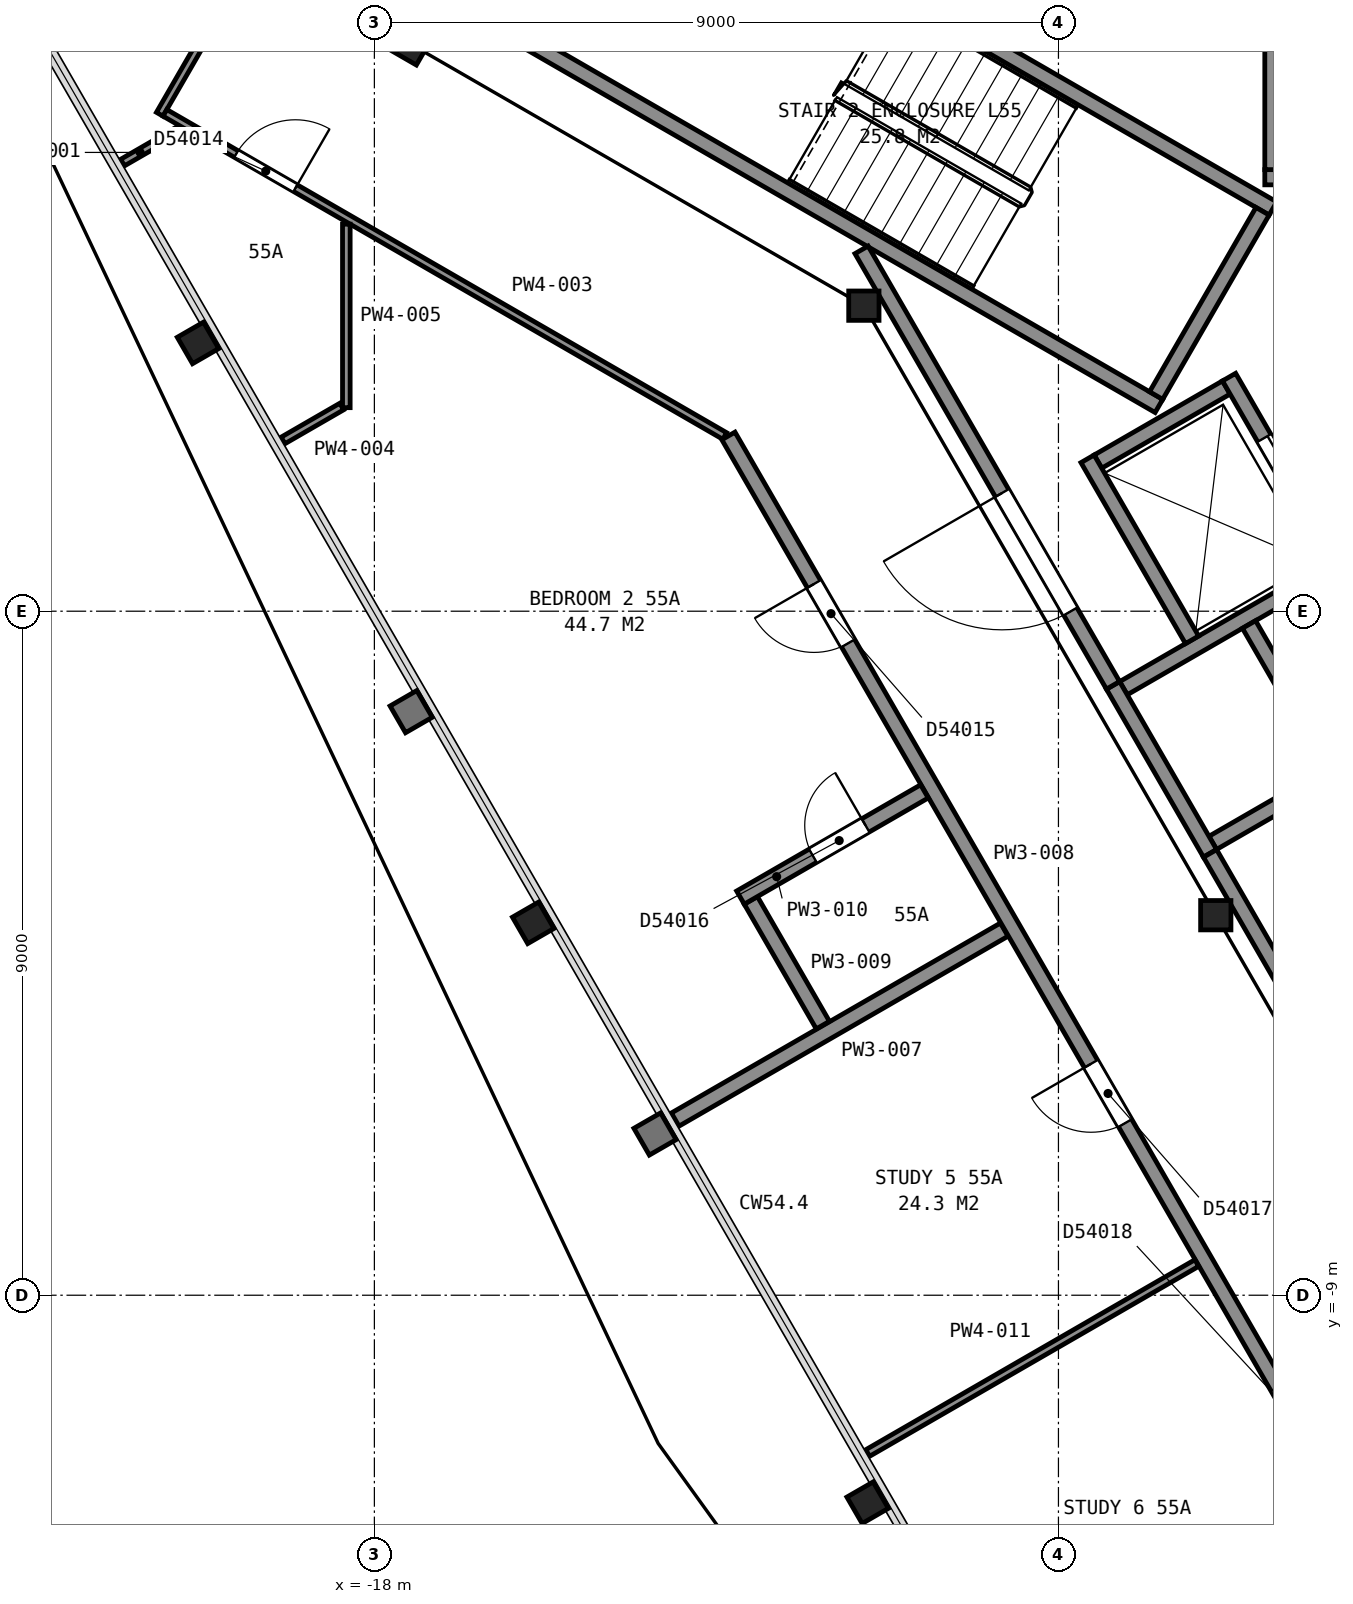
"""IFC4 building model, lengths in metres.
Left out: names, types, materials, properties, quantities, classifications, styles, units other than length and angle.
Written with IfcOpenShell. Run it as: python <this file> out.ifc"""

import sys

from ifc_helpers import new_model, si_unit, direction, frame, frame_2d, origin, origin_2d, place, context, subcontext, project, spatial, rectangle, i_section, extrude, element, fill, save


model = new_model("IFC4")
c1 = context("Model", 3, precision=1e-05, world=origin(), true_north=direction((0.0, 1.0)))
c2 = subcontext(c1, "Body", "Model", "MODEL_VIEW")
j1 = project(units=[si_unit("LENGTHUNIT", "METRE"), si_unit("PLANEANGLEUNIT", "RADIAN")], contexts=[c1])
p1 = place(None, origin())
s1 = spatial("IfcSite", under=j1, at=p1, CompositionType="ELEMENT")
p2 = place(p1, origin())
s2 = spatial("IfcBuilding", under=s1, at=p2, CompositionType="ELEMENT")
p3 = place(p2, frame((0.0, 0.0, 221.2)))
s3 = spatial("IfcBuildingStorey", under=s2, at=p3, CompositionType="ELEMENT", Elevation=221.2)
for number, where, z_axis, x_axis in (
    (1, (-20.32, 3.53, 0.0), (0.0, 0.0, 1.0), (-0.5, 0.866, 0.0)),
    (2, (-15.91, -4.1, 0.0), (0.0, 0.0, 1.0), (-0.5, 0.866, 0.0)),
    (3, (-11.51, -11.73, 0.0), (0.0, 0.0, 1.0), (-0.5, 0.866, 0.0)),
    (4, (-17.52, 7.46, 0.0), (0.0, 0.0, 1.0), (0.5, 0.866, 0.0)),
):
    element("IfcColumn", number, at=place(p3, frame(where, z_axis=z_axis, x_axis=x_axis)), inside=s3, PredefinedType="COLUMN", context=c2, shape_type="SweptSolid", body=[
        extrude(i_section(OverallWidth=0.401, OverallDepth=0.399, WebThickness=0.025, FlangeThickness=0.04, FilletRadius=0.015, at=origin_2d()), origin(), (0.0, 0.0, 1.0), 3.7),
    ])
for number, where, z_axis, x_axis in (
    (5, (-11.56, 4.02, 0.0), (0.0, 0.0, 1.0), (1.0, 0.0, 0.0)),
    (6, (-6.93, -4.0, 0.0), (0.0, 0.0, 1.0), (1.0, 0.0, 0.0)),
):
    element("IfcColumn", number, at=place(p3, frame(where, z_axis=z_axis, x_axis=x_axis)), inside=s3, PredefinedType="COLUMN", context=c2, shape_type="SweptSolid", body=[
        extrude(i_section(OverallWidth=0.399, OverallDepth=0.386, WebThickness=0.021, FlangeThickness=0.033, FilletRadius=0.015, at=origin_2d()), origin(), (0.0, 0.0, 1.0), 3.7),
    ])
for number, where, z_axis, x_axis in (
    (7, (-7.678, 2.701, 0.0), (0.0, 0.0, 1.0), (-0.866, 0.5, 0.0)),
    (8, (-6.178, 5.299, 0.0), (0.0, 0.0, 1.0), (-0.866, 0.5, 0.0)),
):
    element("IfcWall", number, at=place(p3, frame(where, z_axis=z_axis, x_axis=x_axis)), inside=s3, PredefinedType="PARTITIONING", context=c2, shape_type="SweptSolid", body=[
        extrude(rectangle(XDim=9.6, YDim=0.2, at=frame_2d((4.8, 0.0))), origin(), (0.0, 0.0, 1.0), 3.45),
    ])
p4 = place(p3, frame((-6.315, 5.262, 0.0), z_axis=(0.0, 0.0, 1.0), x_axis=(-0.500049511043, -0.865996816683, 0.0)))
e9 = element("IfcWall", 9, at=p4, inside=s3, PredefinedType="PARTITIONING", context=c2, shape_type="SweptSolid", body=[
    extrude(rectangle(XDim=2.8, YDim=0.2, at=frame_2d((1.4, 0.0))), origin(), (0.0, 0.0, 1.0), 3.45),
])
p5 = place(p3, frame((-6.285, 5.71, 0.0), z_axis=(0.0, 0.0, 1.0), x_axis=(1.0, 0.0, 0.0)))
e10 = element("IfcWall", 10, at=p5, inside=s3, PredefinedType="PARTITIONING", context=c2, shape_type="SweptSolid", body=[
    extrude(rectangle(XDim=2.35, YDim=0.2, at=frame_2d((1.175, 0.0))), origin(), (0.0, 0.0, 1.0), 3.7),
])
p6 = place(p3, frame((-6.97, -3.048, 0.0), z_axis=(0.0, 0.0, 1.0), x_axis=(0.866036909293, 0.499980071345, 0.0)))
e11 = element("IfcWall", 11, at=p6, inside=s3, PredefinedType="PARTITIONING", context=c2, shape_type="SweptSolid", body=[
    extrude(rectangle(XDim=1.75, YDim=0.2, at=frame_2d((0.875, 0.0))), origin(), (0.0, 0.0, 1.0), 3.7),
])
p7 = place(p3, frame((-8.145, -1.013, 0.0), z_axis=(0.0, 0.0, 1.0), x_axis=(0.866016494683, 0.500015430699, 0.0)))
e12 = element("IfcWall", 12, at=p7, inside=s3, PredefinedType="PARTITIONING", context=c2, shape_type="SweptSolid", body=[
    extrude(rectangle(XDim=3.15, YDim=0.2, at=frame_2d((1.575, 0.0))), origin(), (0.0, 0.0, 1.0), 3.7),
])
p8 = place(p3, frame((-8.48, 1.969, 0.0), z_axis=(0.0, 0.0, 1.0), x_axis=(0.866000020948, 0.500043961785, 0.0)))
e13 = element("IfcWall", 13, at=p8, inside=s3, PredefinedType="PARTITIONING", context=c2, shape_type="SweptSolid", body=[
    extrude(rectangle(XDim=1.95, YDim=0.2, at=frame_2d((0.975, 0.0))), origin(), (0.0, 0.0, 1.0), 3.7),
])
p9 = place(p3, frame((-6.185, 5.81, 0.0), z_axis=(0.0, 0.0, 1.0), x_axis=(0.0, 1.0, 0.0)))
e14 = element("IfcWall", 14, at=p9, inside=s3, PredefinedType="PARTITIONING", context=c2, shape_type="SweptSolid", body=[
    extrude(rectangle(XDim=1.75, YDim=0.2, at=frame_2d((0.875, 0.0))), origin(), (0.0, 0.0, 1.0), 3.7),
])
p10 = place(p3, frame((-5.28, 0.525, 0.0), z_axis=(0.0, 0.0, 1.0), x_axis=(-0.500037662692, 0.866003658127, 0.0)))
e15 = element("IfcWall", 15, at=p10, inside=s3, PredefinedType="PARTITIONING", context=c2, shape_type="SweptSolid", body=[
    extrude(rectangle(XDim=2.95, YDim=0.2, at=frame_2d((1.475, 0.0))), origin(), (0.0, 0.0, 1.0), 3.7),
])
p11 = place(p10, frame((0.925, 0.0, 0.0)))
e16 = element("IfcOpeningElement", 16, at=p11, cuts=e15, PredefinedType="OPENING", context=c2, shape_type="SweptSolid", body=[
    extrude(rectangle(XDim=1.1, YDim=2.1, at=frame_2d((0.55, 1.05))), frame((0.0, 0.11, 0.0), z_axis=(0.0, -1.0, 0.0), x_axis=(1.0, 0.0, 0.0)), (0.0, 0.0, 1.0), 0.22),
])
p12 = place(p3, frame((-5.318, -2.21, 0.0), z_axis=(0.0, 0.0, 1.0), x_axis=(-0.499938297808, 0.866061024631, 0.0)))
e17 = element("IfcWall", 17, at=p12, inside=s3, PredefinedType="PARTITIONING", context=c2, shape_type="SweptSolid", body=[
    extrude(rectangle(XDim=2.35, YDim=0.2, at=frame_2d((1.175, 0.0))), origin(), (0.0, 0.0, 1.0), 3.7),
])
p13 = place(p3, frame((-7.242, -0.376, 0.0), z_axis=(0.0, 0.0, 1.0), x_axis=(-0.499996545922, 0.866027397988, 0.0)))
e18 = element("IfcWall", 18, at=p13, inside=s3, PredefinedType="PARTITIONING", context=c2, shape_type="SweptSolid", body=[
    extrude(rectangle(XDim=2.75, YDim=0.2, at=frame_2d((1.375, 0.0))), origin(), (0.0, 0.0, 1.0), 3.7),
])
p14 = place(p3, frame((-7.006, -3.185, 0.0), z_axis=(0.0, 0.0, 1.0), x_axis=(-0.499990435942, 0.866030925526, 0.0)))
e19 = element("IfcWall", 19, at=p14, inside=s3, PredefinedType="PARTITIONING", context=c2, shape_type="SweptSolid", body=[
    extrude(rectangle(XDim=2.55, YDim=0.2, at=frame_2d((1.275, 0.0))), origin(), (0.0, 0.0, 1.0), 3.7),
])
p15 = place(p3, frame((-11.591, 4.755, 0.0), z_axis=(0.0, 0.0, 1.0), x_axis=(0.500043977787, -0.866000011708, 0.0)))
e20 = element("IfcWall", 20, at=p15, inside=s3, PredefinedType="PARTITIONING", context=c2, shape_type="SweptSolid", body=[
    extrude(rectangle(XDim=6.617, YDim=0.2, at=frame_2d((3.308, 0.0))), origin(), (0.0, 0.0, 1.0), 3.45),
])
p16 = place(p15, frame((3.695, 0.0, 0.0)))
e21 = element("IfcOpeningElement", 21, at=p16, cuts=e20, PredefinedType="OPENING", context=c2, shape_type="SweptSolid", body=[
    extrude(rectangle(XDim=1.8, YDim=2.1, at=frame_2d((0.9, 1.05))), frame((0.0, 0.11, 0.0), z_axis=(0.0, -1.0, 0.0), x_axis=(1.0, 0.0, 0.0)), (0.0, 0.0, 1.0), 0.22),
])
p17 = place(p3, frame((-7.005, -3.187, 0.0), z_axis=(0.0, 0.0, 1.0), x_axis=(0.499689606989, -0.866204535123, 0.0)))
e22 = element("IfcWall", 22, at=p17, inside=s3, PredefinedType="PARTITIONING", context=c2, shape_type="SweptSolid", body=[
    extrude(rectangle(XDim=2.145, YDim=0.2, at=frame_2d((1.072, 0.0))), origin(), (0.0, 0.0, 1.0), 3.45),
])
p18 = place(p3, frame((-21.313, 5.903, 0.0), z_axis=(0.0, 0.0, 1.0), x_axis=(0.865952303503, 0.500126592033, 0.0)))
e23 = element("IfcWall", 23, at=p18, inside=s3, PredefinedType="PARTITIONING", context=c2, shape_type="SweptSolid", body=[
    extrude(rectangle(XDim=0.889, YDim=0.1, at=frame_2d((0.444, 0.0))), origin(), (0.0, 0.0, 1.0), 2.713),
])
p19 = place(p3, frame((-20.824, 6.539, 0.0), z_axis=(0.0, 0.0, 1.0), x_axis=(0.500297300687, 0.865853689098, 0.0)))
e24 = element("IfcWall", 24, at=p19, inside=s3, PredefinedType="PARTITIONING", context=c2, shape_type="SweptSolid", body=[
    extrude(rectangle(XDim=9.496, YDim=0.1, at=frame_2d((4.748, 0.0))), origin(), (0.0, 0.0, 1.0), 2.713),
])
p20 = place(p3, frame((-13.391, 2.305, 0.0), z_axis=(0.0, 0.0, 1.0), x_axis=(-0.86606177021, 0.499937006213, 0.0)))
e25 = element("IfcWall", 25, at=p20, inside=s3, PredefinedType="PARTITIONING", context=c2, shape_type="SweptSolid", body=[
    extrude(rectangle(XDim=8.504, YDim=0.1, at=frame_2d((4.252, 0.0))), origin(), (0.0, 0.0, 1.0), 2.713),
])
p21 = place(p20, frame((6.522, 0.0, 0.0)))
e26 = element("IfcOpeningElement", 26, at=p21, cuts=e25, PredefinedType="OPENING", context=c2, shape_type="SweptSolid", body=[
    extrude(rectangle(XDim=0.9, YDim=2.1, at=frame_2d((0.45, 1.05))), frame((0.0, 0.06, 0.0), z_axis=(0.0, -1.0, 0.0), x_axis=(1.0, 0.0, 0.0)), (0.0, 0.0, 1.0), 0.12),
])
p22 = place(p3, frame((-19.202, 2.247, 0.0), z_axis=(0.0, 0.0, 1.0), x_axis=(0.86604424267, 0.499967368674, 0.0)))
e27 = element("IfcWall", 27, at=p22, inside=s3, PredefinedType="PARTITIONING", context=c2, shape_type="SweptSolid", body=[
    extrude(rectangle(XDim=0.892, YDim=0.1, at=frame_2d((0.446, 0.0))), origin(), (0.0, 0.0, 1.0), 2.713),
])
p23 = place(p3, frame((-18.369, 2.678, 0.0), z_axis=(0.0, 0.0, 1.0), x_axis=(0.0, 1.0, 0.0)))
e28 = element("IfcWall", 28, at=p23, inside=s3, PredefinedType="PARTITIONING", context=c2, shape_type="SweptSolid", body=[
    extrude(rectangle(XDim=2.414, YDim=0.1, at=frame_2d((1.207, 0.0))), origin(), (0.0, 0.0, 1.0), 2.713),
])
p24 = place(p3, frame((-14.043, -6.689, 0.0), z_axis=(0.0, 0.0, 1.0), x_axis=(0.866053039883, 0.499952129818, 0.0)))
e29 = element("IfcWall", 29, at=p24, inside=s3, PredefinedType="PARTITIONING", context=c2, shape_type="SweptSolid", body=[
    extrude(rectangle(XDim=5.0, YDim=0.2, at=frame_2d((2.5, 0.0))), origin(), (0.0, 0.0, 1.0), 2.713),
])
p25 = place(p3, frame((-4.675, -12.706, 0.0), z_axis=(0.0, 0.0, 1.0), x_axis=(-0.49997440863, 0.866040178465, 0.0)))
e30 = element("IfcWall", 30, at=p25, inside=s3, PredefinedType="PARTITIONING", context=c2, shape_type="SweptSolid", body=[
    extrude(rectangle(XDim=17.335, YDim=0.2, at=frame_2d((8.667, 0.0))), origin(), (0.0, 0.0, 1.0), 2.713),
])
p26 = place(p25, frame((14.185, 0.0, 0.0)))
e31 = element("IfcOpeningElement", 31, at=p26, cuts=e30, PredefinedType="OPENING", context=c2, shape_type="SweptSolid", body=[
    extrude(rectangle(XDim=0.9, YDim=2.1, at=frame_2d((0.45, 1.05))), frame((0.0, 0.11, 0.0), z_axis=(0.0, -1.0, 0.0), x_axis=(1.0, 0.0, 0.0)), (0.0, 0.0, 1.0), 0.22),
])
p27 = place(p25, frame((6.895, 0.0, 0.0)))
e32 = element("IfcOpeningElement", 32, at=p27, cuts=e30, PredefinedType="OPENING", context=c2, shape_type="SweptSolid", body=[
    extrude(rectangle(XDim=0.9, YDim=2.1, at=frame_2d((0.45, 1.05))), frame((0.0, 0.11, 0.0), z_axis=(0.0, -1.0, 0.0), x_axis=(1.0, 0.0, 0.0)), (0.0, 0.0, 1.0), 0.22),
])
p28 = place(p25, frame((1.979, 0.0, 0.0)))
e33 = element("IfcOpeningElement", 33, at=p28, cuts=e30, PredefinedType="OPENING", context=c2, shape_type="SweptSolid", body=[
    extrude(rectangle(XDim=0.9, YDim=2.1, at=frame_2d((0.45, 1.05))), frame((0.0, 0.11, 0.0), z_axis=(0.0, -1.0, 0.0), x_axis=(1.0, 0.0, 0.0)), (0.0, 0.0, 1.0), 0.22),
])
p29 = place(p3, frame((-13.047, -3.805, 0.0), z_axis=(0.0, 0.0, 1.0), x_axis=(0.499949193323, -0.866054735046, 0.0)))
e34 = element("IfcWall", 34, at=p29, inside=s3, PredefinedType="PARTITIONING", context=c2, shape_type="SweptSolid", body=[
    extrude(rectangle(XDim=1.895, YDim=0.2, at=frame_2d((0.948, 0.0))), origin(), (0.0, 0.0, 1.0), 2.713),
])
p30 = place(p3, frame((-10.763, -2.371, 0.0), z_axis=(0.0, 0.0, 1.0), x_axis=(-0.866041588165, -0.499971966783, 0.0)))
e35 = element("IfcWall", 35, at=p30, inside=s3, PredefinedType="PARTITIONING", context=c2, shape_type="SweptSolid", body=[
    extrude(rectangle(XDim=2.795, YDim=0.2, at=frame_2d((1.397, 0.0))), origin(), (0.0, 0.0, 1.0), 2.713),
])
p31 = place(p30, frame((0.895, 0.0, 0.0)))
e36 = element("IfcOpeningElement", 36, at=p31, cuts=e35, PredefinedType="OPENING", context=c2, shape_type="SweptSolid", body=[
    extrude(rectangle(XDim=0.8, YDim=2.1, at=frame_2d((0.4, 1.05))), frame((0.0, 0.11, 0.0), z_axis=(0.0, -1.0, 0.0), x_axis=(1.0, 0.0, 0.0)), (0.0, 0.0, 1.0), 0.22),
])
p32 = place(p3, frame((-11.51, -11.076, 0.0), z_axis=(0.0, 0.0, 1.0), x_axis=(0.866053039883, 0.499952129818, 0.0)))
e37 = element("IfcWall", 37, at=p32, inside=s3, PredefinedType="PARTITIONING", context=c2, shape_type="SweptSolid", body=[
    extrude(rectangle(XDim=5.0, YDim=0.1, at=frame_2d((2.5, 0.0))), origin(), (0.0, 0.0, 1.0), 2.713),
])
p33 = place(p11, origin())
e38 = element("IfcDoor", 38, at=p33, inside=s3, OperationType="SLIDING_TO_LEFT", PredefinedType="DOOR", context=c2, shape_type="SweptSolid", body=[
    extrude(rectangle(XDim=1.1, YDim=2.1, at=frame_2d((0.55, 1.05))), frame((0.0, 0.025, 0.0), z_axis=(0.0, -1.0, 0.0), x_axis=(1.0, 0.0, 0.0)), (0.0, 0.0, 1.0), 0.05),
])
fill(e16, e38)
p34 = place(p16, origin())
e39 = element("IfcDoor", 39, at=p34, inside=s3, OperationType="DOUBLE_DOOR_SINGLE_SWING", PredefinedType="DOOR", context=c2, shape_type="SweptSolid", body=[
    extrude(rectangle(XDim=1.8, YDim=2.1, at=frame_2d((0.9, 1.05))), frame((0.0, 0.025, 0.0), z_axis=(0.0, -1.0, 0.0), x_axis=(1.0, 0.0, 0.0)), (0.0, 0.0, 1.0), 0.05),
])
fill(e21, e39)
p35 = place(p21, origin())
e40 = element("IfcDoor", 40, at=p35, inside=s3, OperationType="SINGLE_SWING_LEFT", PredefinedType="DOOR", context=c2, shape_type="SweptSolid", body=[
    extrude(rectangle(XDim=0.9, YDim=2.1, at=frame_2d((0.45, 1.05))), frame((0.0, 0.025, 0.0), z_axis=(0.0, -1.0, 0.0), x_axis=(1.0, 0.0, 0.0)), (0.0, 0.0, 1.0), 0.05),
])
fill(e26, e40)
p36 = place(p26, origin())
e41 = element("IfcDoor", 41, at=p36, inside=s3, OperationType="SINGLE_SWING_RIGHT", PredefinedType="DOOR", context=c2, shape_type="SweptSolid", body=[
    extrude(rectangle(XDim=0.9, YDim=2.1, at=frame_2d((0.45, 1.05))), frame((0.0, 0.025, 0.0), z_axis=(0.0, -1.0, 0.0), x_axis=(1.0, 0.0, 0.0)), (0.0, 0.0, 1.0), 0.05),
])
fill(e31, e41)
p37 = place(p27, origin())
e42 = element("IfcDoor", 42, at=p37, inside=s3, OperationType="SINGLE_SWING_RIGHT", PredefinedType="DOOR", context=c2, shape_type="SweptSolid", body=[
    extrude(rectangle(XDim=0.9, YDim=2.1, at=frame_2d((0.45, 1.05))), frame((0.0, 0.025, 0.0), z_axis=(0.0, -1.0, 0.0), x_axis=(1.0, 0.0, 0.0)), (0.0, 0.0, 1.0), 0.05),
])
fill(e32, e42)
p38 = place(p31, origin())
e43 = element("IfcDoor", 43, at=p38, inside=s3, OperationType="SINGLE_SWING_LEFT", PredefinedType="DOOR", context=c2, shape_type="SweptSolid", body=[
    extrude(rectangle(XDim=0.8, YDim=2.1, at=frame_2d((0.4, 1.05))), frame((0.0, 0.025, 0.0), z_axis=(0.0, -1.0, 0.0), x_axis=(1.0, 0.0, 0.0)), (0.0, 0.0, 1.0), 0.05),
])
fill(e36, e43)
save(model, sys.argv[1])
